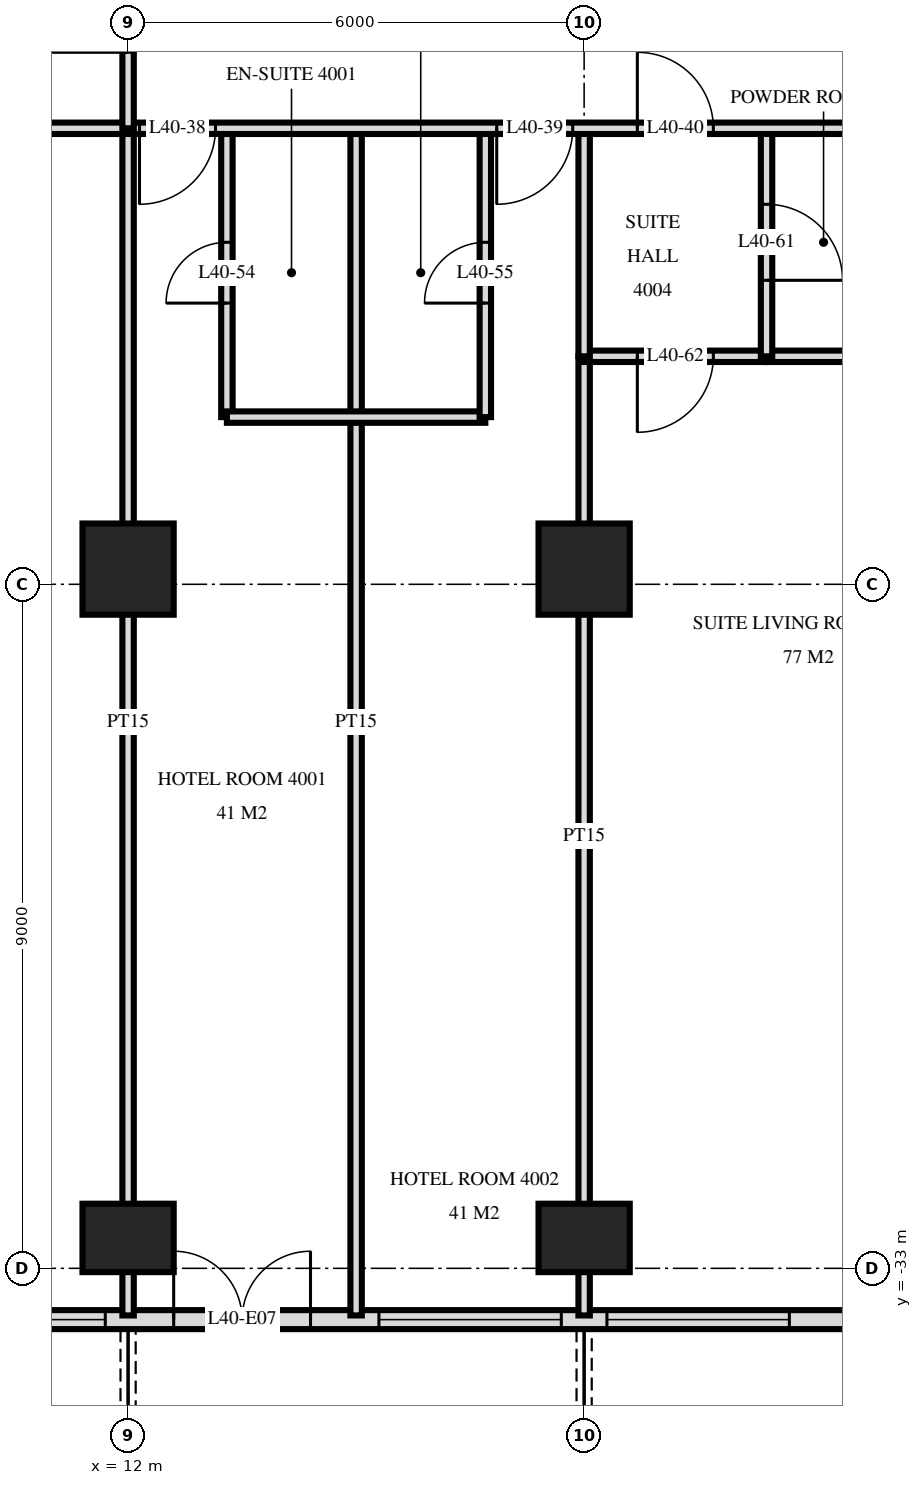
"""IFC4 building model, lengths in metres.
Left out: names, types, materials, properties, quantities, classifications, styles, units other than length and angle.
Written with IfcOpenShell. Run it as: python <this file> out.ifc"""

import sys

from ifc_helpers import new_model, si_unit, direction, frame, frame_2d, origin, origin_2d, place, context, subcontext, project, spatial, rectangle, extrude, element, fill, save


model = new_model("IFC4")
c1 = context("Model", 3, precision=1e-05, world=origin(), true_north=direction((0.0, 1.0)))
c2 = subcontext(c1, "Body", "Model", "MODEL_VIEW")
j1 = project(units=[si_unit("LENGTHUNIT", "METRE"), si_unit("PLANEANGLEUNIT", "RADIAN")], contexts=[c1])
p1 = place(None, origin())
s1 = spatial("IfcSite", under=j1, at=p1, CompositionType="ELEMENT")
p2 = place(p1, origin())
s2 = spatial("IfcBuilding", under=s1, at=p2, CompositionType="ELEMENT")
p3 = place(p2, frame((0.0, 0.0, 156.0)))
s3 = spatial("IfcBuildingStorey", under=s2, at=p3, CompositionType="ELEMENT", Elevation=156.0)
p4 = place(p3, frame((12.0, -32.6, 0.0), z_axis=(0.0, 0.0, 1.0), x_axis=(1.0, 0.0, 0.0)))
e1 = element("IfcColumn", 1, at=p4, inside=s3, PredefinedType="COLUMN", context=c2, shape_type="SweptSolid", body=[
    extrude(rectangle(XDim=1.2, YDim=0.9, at=origin_2d()), origin(), (0.0, 0.0, 1.0), 3.6),
])
p5 = place(p3, frame((12.0, -23.8, 0.0), z_axis=(0.0, 0.0, 1.0), x_axis=(1.0, 0.0, 0.0)))
e2 = element("IfcColumn", 2, at=p5, inside=s3, PredefinedType="COLUMN", context=c2, shape_type="SweptSolid", body=[
    extrude(rectangle(XDim=1.2, YDim=1.2, at=origin_2d()), origin(), (0.0, 0.0, 1.0), 3.6),
])
p6 = place(p3, frame((18.0, -32.6, 0.0), z_axis=(0.0, 0.0, 1.0), x_axis=(1.0, 0.0, 0.0)))
e3 = element("IfcColumn", 3, at=p6, inside=s3, PredefinedType="COLUMN", context=c2, shape_type="SweptSolid", body=[
    extrude(rectangle(XDim=1.2, YDim=0.9, at=origin_2d()), origin(), (0.0, 0.0, 1.0), 3.6),
])
p7 = place(p3, frame((18.0, -23.8, 0.0), z_axis=(0.0, 0.0, 1.0), x_axis=(1.0, 0.0, 0.0)))
e4 = element("IfcColumn", 4, at=p7, inside=s3, PredefinedType="COLUMN", context=c2, shape_type="SweptSolid", body=[
    extrude(rectangle(XDim=1.2, YDim=1.2, at=origin_2d()), origin(), (0.0, 0.0, 1.0), 3.6),
])
p8 = place(p3, frame((-23.675, -33.675, 0.0), z_axis=(0.0, 0.0, 1.0), x_axis=(1.0, 0.0, 0.0)))
e5 = element("IfcWall", 5, at=p8, inside=s3, PredefinedType="SOLIDWALL", context=c2, shape_type="SweptSolid", body=[
    extrude(rectangle(XDim=47.351, YDim=0.25, at=frame_2d((23.675, 0.0))), origin(), (0.0, 0.0, 1.0), 3.32),
])
p9 = place(p8, frame((0.275, 0.0, 0.3)))
e6 = element("IfcOpeningElement", 6, at=p9, cuts=e5, PredefinedType="OPENING", context=c2, shape_type="SweptSolid", body=[
    extrude(rectangle(XDim=2.4, YDim=2.1, at=frame_2d((1.2, 1.05))), frame((0.0, 0.135, 0.0), z_axis=(0.0, -1.0, 0.0), x_axis=(1.0, 0.0, 0.0)), (0.0, 0.0, 1.0), 0.27),
])
p10 = place(p8, frame((3.425, 0.0, 0.0)))
e7 = element("IfcOpeningElement", 7, at=p10, cuts=e5, PredefinedType="OPENING", context=c2, shape_type="SweptSolid", body=[
    extrude(rectangle(XDim=1.8, YDim=2.4, at=frame_2d((0.9, 1.2))), frame((0.0, 0.135, 0.0), z_axis=(0.0, -1.0, 0.0), x_axis=(1.0, 0.0, 0.0)), (0.0, 0.0, 1.0), 0.27),
])
p11 = place(p8, frame((7.775, 0.0, 0.0)))
e8 = element("IfcOpeningElement", 8, at=p11, cuts=e5, PredefinedType="OPENING", context=c2, shape_type="SweptSolid", body=[
    extrude(rectangle(XDim=1.8, YDim=2.4, at=frame_2d((0.9, 1.2))), frame((0.0, 0.135, 0.0), z_axis=(0.0, -1.0, 0.0), x_axis=(1.0, 0.0, 0.0)), (0.0, 0.0, 1.0), 0.27),
])
p12 = place(p8, frame((12.275, 0.0, 0.0)))
e9 = element("IfcOpeningElement", 9, at=p12, cuts=e5, PredefinedType="OPENING", context=c2, shape_type="SweptSolid", body=[
    extrude(rectangle(XDim=1.8, YDim=2.4, at=frame_2d((0.9, 1.2))), frame((0.0, 0.135, 0.0), z_axis=(0.0, -1.0, 0.0), x_axis=(1.0, 0.0, 0.0)), (0.0, 0.0, 1.0), 0.27),
])
p13 = place(p8, frame((14.975, 0.0, 0.3)))
e10 = element("IfcOpeningElement", 10, at=p13, cuts=e5, PredefinedType="OPENING", context=c2, shape_type="SweptSolid", body=[
    extrude(rectangle(XDim=2.4, YDim=2.1, at=frame_2d((1.2, 1.05))), frame((0.0, 0.135, 0.0), z_axis=(0.0, -1.0, 0.0), x_axis=(1.0, 0.0, 0.0)), (0.0, 0.0, 1.0), 0.27),
])
p14 = place(p8, frame((17.975, 0.0, 0.3)))
e11 = element("IfcOpeningElement", 11, at=p14, cuts=e5, PredefinedType="OPENING", context=c2, shape_type="SweptSolid", body=[
    extrude(rectangle(XDim=2.4, YDim=2.1, at=frame_2d((1.2, 1.05))), frame((0.0, 0.135, 0.0), z_axis=(0.0, -1.0, 0.0), x_axis=(1.0, 0.0, 0.0)), (0.0, 0.0, 1.0), 0.27),
])
p15 = place(p8, frame((21.275, 0.0, 0.0)))
e12 = element("IfcOpeningElement", 12, at=p15, cuts=e5, PredefinedType="OPENING", context=c2, shape_type="SweptSolid", body=[
    extrude(rectangle(XDim=1.8, YDim=2.4, at=frame_2d((0.9, 1.2))), frame((0.0, 0.135, 0.0), z_axis=(0.0, -1.0, 0.0), x_axis=(1.0, 0.0, 0.0)), (0.0, 0.0, 1.0), 0.27),
])
p16 = place(p8, frame((24.275, 0.0, 0.0)))
e13 = element("IfcOpeningElement", 13, at=p16, cuts=e5, PredefinedType="OPENING", context=c2, shape_type="SweptSolid", body=[
    extrude(rectangle(XDim=1.8, YDim=2.4, at=frame_2d((0.9, 1.2))), frame((0.0, 0.135, 0.0), z_axis=(0.0, -1.0, 0.0), x_axis=(1.0, 0.0, 0.0)), (0.0, 0.0, 1.0), 0.27),
])
p17 = place(p8, frame((26.975, 0.0, 0.3)))
e14 = element("IfcOpeningElement", 14, at=p17, cuts=e5, PredefinedType="OPENING", context=c2, shape_type="SweptSolid", body=[
    extrude(rectangle(XDim=2.4, YDim=2.1, at=frame_2d((1.2, 1.05))), frame((0.0, 0.135, 0.0), z_axis=(0.0, -1.0, 0.0), x_axis=(1.0, 0.0, 0.0)), (0.0, 0.0, 1.0), 0.27),
])
p18 = place(p8, frame((30.275, 0.0, 0.0)))
e15 = element("IfcOpeningElement", 15, at=p18, cuts=e5, PredefinedType="OPENING", context=c2, shape_type="SweptSolid", body=[
    extrude(rectangle(XDim=1.8, YDim=2.4, at=frame_2d((0.9, 1.2))), frame((0.0, 0.135, 0.0), z_axis=(0.0, -1.0, 0.0), x_axis=(1.0, 0.0, 0.0)), (0.0, 0.0, 1.0), 0.27),
])
p19 = place(p8, frame((32.975, 0.0, 0.3)))
e16 = element("IfcOpeningElement", 16, at=p19, cuts=e5, PredefinedType="OPENING", context=c2, shape_type="SweptSolid", body=[
    extrude(rectangle(XDim=2.4, YDim=2.1, at=frame_2d((1.2, 1.05))), frame((0.0, 0.135, 0.0), z_axis=(0.0, -1.0, 0.0), x_axis=(1.0, 0.0, 0.0)), (0.0, 0.0, 1.0), 0.27),
])
p20 = place(p8, frame((36.275, 0.0, 0.0)))
e17 = element("IfcOpeningElement", 17, at=p20, cuts=e5, PredefinedType="OPENING", context=c2, shape_type="SweptSolid", body=[
    extrude(rectangle(XDim=1.8, YDim=2.4, at=frame_2d((0.9, 1.2))), frame((0.0, 0.135, 0.0), z_axis=(0.0, -1.0, 0.0), x_axis=(1.0, 0.0, 0.0)), (0.0, 0.0, 1.0), 0.27),
])
p21 = place(p8, frame((38.975, 0.0, 0.3)))
e18 = element("IfcOpeningElement", 18, at=p21, cuts=e5, PredefinedType="OPENING", context=c2, shape_type="SweptSolid", body=[
    extrude(rectangle(XDim=2.4, YDim=2.1, at=frame_2d((1.2, 1.05))), frame((0.0, 0.135, 0.0), z_axis=(0.0, -1.0, 0.0), x_axis=(1.0, 0.0, 0.0)), (0.0, 0.0, 1.0), 0.27),
])
p22 = place(p8, frame((41.975, 0.0, 0.3)))
e19 = element("IfcOpeningElement", 19, at=p22, cuts=e5, PredefinedType="OPENING", context=c2, shape_type="SweptSolid", body=[
    extrude(rectangle(XDim=2.4, YDim=2.1, at=frame_2d((1.2, 1.05))), frame((0.0, 0.135, 0.0), z_axis=(0.0, -1.0, 0.0), x_axis=(1.0, 0.0, 0.0)), (0.0, 0.0, 1.0), 0.27),
])
p23 = place(p8, frame((45.125, 0.0, 0.0)))
e20 = element("IfcOpeningElement", 20, at=p23, cuts=e5, PredefinedType="OPENING", context=c2, shape_type="SweptSolid", body=[
    extrude(rectangle(XDim=1.8, YDim=2.4, at=frame_2d((0.9, 1.2))), frame((0.0, 0.135, 0.0), z_axis=(0.0, -1.0, 0.0), x_axis=(1.0, 0.0, 0.0)), (0.0, 0.0, 1.0), 0.27),
])
p24 = place(p3, frame((20.4, -21.0, 0.0), z_axis=(0.0, 0.0, 1.0), x_axis=(0.0, 1.0, 0.0)))
e21 = element("IfcWall", 21, at=p24, inside=s3, PredefinedType="PARTITIONING", context=c2, shape_type="SweptSolid", body=[
    extrude(rectangle(XDim=3.0, YDim=0.15, at=frame_2d((1.5, 0.0))), origin(), (0.0, 0.0, 1.0), 3.32),
])
p25 = place(p24, frame((1.0, 0.0, 0.0)))
e22 = element("IfcOpeningElement", 22, at=p25, cuts=e21, PredefinedType="OPENING", context=c2, shape_type="SweptSolid", body=[
    extrude(rectangle(XDim=1.0, YDim=2.1, at=frame_2d((0.5, 1.05))), frame((0.0, 0.085, 0.0), z_axis=(0.0, -1.0, 0.0), x_axis=(1.0, 0.0, 0.0)), (0.0, 0.0, 1.0), 0.17),
])
p26 = place(p3, frame((18.0, -21.0, 0.0), z_axis=(0.0, 0.0, 1.0), x_axis=(0.0, 1.0, 0.0)))
e23 = element("IfcWall", 23, at=p26, inside=s3, PredefinedType="PARTITIONING", context=c2, shape_type="SweptSolid", body=[
    extrude(rectangle(XDim=3.0, YDim=0.15, at=frame_2d((1.5, 0.0))), origin(), (0.0, 0.0, 1.0), 3.32),
])
p27 = place(p3, frame((18.0, -33.62, 0.0), z_axis=(0.0, 0.0, 1.0), x_axis=(0.0, 1.0, 0.0)))
e24 = element("IfcWall", 24, at=p27, inside=s3, PredefinedType="PARTITIONING", context=c2, shape_type="SweptSolid", body=[
    extrude(rectangle(XDim=12.62, YDim=0.15, at=frame_2d((6.31, 0.0))), origin(), (0.0, 0.0, 1.0), 3.32),
])
p28 = place(p3, frame((16.7, -21.8, 0.0), z_axis=(0.0, 0.0, 1.0), x_axis=(0.0, 1.0, 0.0)))
e25 = element("IfcWall", 25, at=p28, inside=s3, PredefinedType="PARTITIONING", context=c2, shape_type="SweptSolid", body=[
    extrude(rectangle(XDim=3.8, YDim=0.15, at=frame_2d((1.9, 0.0))), origin(), (0.0, 0.0, 1.0), 3.32),
])
p29 = place(p28, frame((1.5, 0.0, 0.0)))
e26 = element("IfcOpeningElement", 26, at=p29, cuts=e25, PredefinedType="OPENING", context=c2, shape_type="SweptSolid", body=[
    extrude(rectangle(XDim=0.8, YDim=2.1, at=frame_2d((0.4, 1.05))), frame((0.0, 0.085, 0.0), z_axis=(0.0, -1.0, 0.0), x_axis=(1.0, 0.0, 0.0)), (0.0, 0.0, 1.0), 0.17),
])
p30 = place(p3, frame((15.0, -33.62, 0.0), z_axis=(0.0, 0.0, 1.0), x_axis=(0.0, 1.0, 0.0)))
e27 = element("IfcWall", 27, at=p30, inside=s3, PredefinedType="PARTITIONING", context=c2, shape_type="SweptSolid", body=[
    extrude(rectangle(XDim=15.62, YDim=0.15, at=frame_2d((7.81, 0.0))), origin(), (0.0, 0.0, 1.0), 3.32),
])
p31 = place(p3, frame((13.3, -21.8, 0.0), z_axis=(0.0, 0.0, 1.0), x_axis=(0.0, 1.0, 0.0)))
e28 = element("IfcWall", 28, at=p31, inside=s3, PredefinedType="PARTITIONING", context=c2, shape_type="SweptSolid", body=[
    extrude(rectangle(XDim=3.8, YDim=0.15, at=frame_2d((1.9, 0.0))), origin(), (0.0, 0.0, 1.0), 3.32),
])
p32 = place(p31, frame((1.5, 0.0, 0.0)))
e29 = element("IfcOpeningElement", 29, at=p32, cuts=e28, PredefinedType="OPENING", context=c2, shape_type="SweptSolid", body=[
    extrude(rectangle(XDim=0.8, YDim=2.1, at=frame_2d((0.4, 1.05))), frame((0.0, 0.085, 0.0), z_axis=(0.0, -1.0, 0.0), x_axis=(1.0, 0.0, 0.0)), (0.0, 0.0, 1.0), 0.17),
])
p33 = place(p3, frame((12.0, -18.0, 0.0), z_axis=(0.0, 0.0, 1.0), x_axis=(0.0, 1.0, 0.0)))
e30 = element("IfcWall", 30, at=p33, inside=s3, PredefinedType="PARTITIONING", context=c2, shape_type="SweptSolid", body=[
    extrude(rectangle(XDim=2.95, YDim=0.15, at=frame_2d((1.475, 0.0))), origin(), (0.0, 0.0, 1.0), 3.32),
])
p34 = place(p33, frame((1.0, 0.0, 0.0)))
e31 = element("IfcOpeningElement", 31, at=p34, cuts=e30, PredefinedType="OPENING", context=c2, shape_type="SweptSolid", body=[
    extrude(rectangle(XDim=1.0, YDim=2.1, at=frame_2d((0.5, 1.05))), frame((0.0, 0.085, 0.0), z_axis=(0.0, -1.0, 0.0), x_axis=(1.0, 0.0, 0.0)), (0.0, 0.0, 1.0), 0.17),
])
p35 = place(p3, frame((12.0, -33.62, 0.0), z_axis=(0.0, 0.0, 1.0), x_axis=(0.0, 1.0, 0.0)))
e32 = element("IfcWall", 32, at=p35, inside=s3, PredefinedType="PARTITIONING", context=c2, shape_type="SweptSolid", body=[
    extrude(rectangle(XDim=15.62, YDim=0.15, at=frame_2d((7.81, 0.0))), origin(), (0.0, 0.0, 1.0), 3.32),
])
p36 = place(p3, frame((13.3, -21.8, 0.0), z_axis=(0.0, 0.0, 1.0), x_axis=(1.0, 0.0, 0.0)))
e33 = element("IfcWall", 33, at=p36, inside=s3, PredefinedType="PARTITIONING", context=c2, shape_type="SweptSolid", body=[
    extrude(rectangle(XDim=3.4, YDim=0.15, at=frame_2d((1.7, 0.0))), origin(), (0.0, 0.0, 1.0), 3.32),
])
p37 = place(p3, frame((18.0, -21.0, 0.0), z_axis=(0.0, 0.0, 1.0), x_axis=(1.0, 0.0, 0.0)))
e34 = element("IfcWall", 34, at=p37, inside=s3, PredefinedType="PARTITIONING", context=c2, shape_type="SweptSolid", body=[
    extrude(rectangle(XDim=2.4, YDim=0.15, at=frame_2d((1.2, 0.0))), origin(), (0.0, 0.0, 1.0), 3.32),
])
p38 = place(p37, frame((0.7, 0.0, 0.0)))
e35 = element("IfcOpeningElement", 35, at=p38, cuts=e34, PredefinedType="OPENING", context=c2, shape_type="SweptSolid", body=[
    extrude(rectangle(XDim=1.0, YDim=2.1, at=frame_2d((0.5, 1.05))), frame((0.0, 0.085, 0.0), z_axis=(0.0, -1.0, 0.0), x_axis=(1.0, 0.0, 0.0)), (0.0, 0.0, 1.0), 0.17),
])
p39 = place(p3, frame((20.4, -21.0, 0.0), z_axis=(0.0, 0.0, 1.0), x_axis=(1.0, 0.0, 0.0)))
e36 = element("IfcWall", 36, at=p39, inside=s3, PredefinedType="PLUMBINGWALL", context=c2, shape_type="SweptSolid", body=[
    extrude(rectangle(XDim=1.5, YDim=0.15, at=frame_2d((0.75, 0.0))), origin(), (0.0, 0.0, 1.0), 3.32),
])
p40 = place(p3, frame((-28.02, -18.0, 0.0), z_axis=(0.0, 0.0, 1.0), x_axis=(1.0, 0.0, 0.0)))
e37 = element("IfcWall", 37, at=p40, inside=s3, PredefinedType="PARTITIONING", context=c2, shape_type="SweptSolid", body=[
    extrude(rectangle(XDim=56.04, YDim=0.15, at=frame_2d((28.02, 0.0))), origin(), (0.0, 0.0, 1.0), 3.32),
])
p41 = place(p40, frame((12.52, 0.0, 0.0)))
e38 = element("IfcOpeningElement", 38, at=p41, cuts=e37, PredefinedType="OPENING", context=c2, shape_type="SweptSolid", body=[
    extrude(rectangle(XDim=1.0, YDim=2.1, at=frame_2d((0.5, 1.05))), frame((0.0, 0.085, 0.0), z_axis=(0.0, -1.0, 0.0), x_axis=(1.0, 0.0, 0.0)), (0.0, 0.0, 1.0), 0.17),
])
p42 = place(p40, frame((8.32, 0.0, 0.0)))
e39 = element("IfcOpeningElement", 39, at=p42, cuts=e37, PredefinedType="OPENING", context=c2, shape_type="SweptSolid", body=[
    extrude(rectangle(XDim=1.0, YDim=2.1, at=frame_2d((0.5, 1.05))), frame((0.0, 0.085, 0.0), z_axis=(0.0, -1.0, 0.0), x_axis=(1.0, 0.0, 0.0)), (0.0, 0.0, 1.0), 0.17),
])
p43 = place(p40, frame((40.17, 0.0, 0.0)))
e40 = element("IfcOpeningElement", 40, at=p43, cuts=e37, PredefinedType="OPENING", context=c2, shape_type="SweptSolid", body=[
    extrude(rectangle(XDim=1.0, YDim=2.1, at=frame_2d((0.5, 1.05))), frame((0.0, 0.085, 0.0), z_axis=(0.0, -1.0, 0.0), x_axis=(1.0, 0.0, 0.0)), (0.0, 0.0, 1.0), 0.17),
])
p44 = place(p40, frame((44.87, 0.0, 0.0)))
e41 = element("IfcOpeningElement", 41, at=p44, cuts=e37, PredefinedType="OPENING", context=c2, shape_type="SweptSolid", body=[
    extrude(rectangle(XDim=1.0, YDim=2.1, at=frame_2d((0.5, 1.05))), frame((0.0, 0.085, 0.0), z_axis=(0.0, -1.0, 0.0), x_axis=(1.0, 0.0, 0.0)), (0.0, 0.0, 1.0), 0.17),
])
p45 = place(p40, frame((46.72, 0.0, 0.0)))
e42 = element("IfcOpeningElement", 42, at=p45, cuts=e37, PredefinedType="OPENING", context=c2, shape_type="SweptSolid", body=[
    extrude(rectangle(XDim=1.0, YDim=2.1, at=frame_2d((0.5, 1.05))), frame((0.0, 0.085, 0.0), z_axis=(0.0, -1.0, 0.0), x_axis=(1.0, 0.0, 0.0)), (0.0, 0.0, 1.0), 0.17),
])
p46 = place(p40, frame((18.52, 0.0, 0.0)))
e43 = element("IfcOpeningElement", 43, at=p46, cuts=e37, PredefinedType="OPENING", context=c2, shape_type="SweptSolid", body=[
    extrude(rectangle(XDim=1.0, YDim=2.1, at=frame_2d((0.5, 1.05))), frame((0.0, 0.085, 0.0), z_axis=(0.0, -1.0, 0.0), x_axis=(1.0, 0.0, 0.0)), (0.0, 0.0, 1.0), 0.17),
])
p47 = place(p40, frame((24.52, 0.0, 0.0)))
e44 = element("IfcOpeningElement", 44, at=p47, cuts=e37, PredefinedType="OPENING", context=c2, shape_type="SweptSolid", body=[
    extrude(rectangle(XDim=1.0, YDim=2.1, at=frame_2d((0.5, 1.05))), frame((0.0, 0.085, 0.0), z_axis=(0.0, -1.0, 0.0), x_axis=(1.0, 0.0, 0.0)), (0.0, 0.0, 1.0), 0.17),
])
p48 = place(p40, frame((30.52, 0.0, 0.0)))
e45 = element("IfcOpeningElement", 45, at=p48, cuts=e37, PredefinedType="OPENING", context=c2, shape_type="SweptSolid", body=[
    extrude(rectangle(XDim=1.0, YDim=2.1, at=frame_2d((0.5, 1.05))), frame((0.0, 0.085, 0.0), z_axis=(0.0, -1.0, 0.0), x_axis=(1.0, 0.0, 0.0)), (0.0, 0.0, 1.0), 0.17),
])
p49 = place(p40, frame((36.52, 0.0, 0.0)))
e46 = element("IfcOpeningElement", 46, at=p49, cuts=e37, PredefinedType="OPENING", context=c2, shape_type="SweptSolid", body=[
    extrude(rectangle(XDim=1.0, YDim=2.1, at=frame_2d((0.5, 1.05))), frame((0.0, 0.085, 0.0), z_axis=(0.0, -1.0, 0.0), x_axis=(1.0, 0.0, 0.0)), (0.0, 0.0, 1.0), 0.17),
])
p50 = place(p19, origin())
e47 = element("IfcWindow", 47, at=p50, inside=s3, PartitioningType="SINGLE_PANEL", PredefinedType="WINDOW", context=c2, shape_type="SweptSolid", body=[
    extrude(rectangle(XDim=2.4, YDim=2.1, at=frame_2d((1.2, 1.05))), frame((0.0, 0.03, 0.0), z_axis=(0.0, -1.0, 0.0), x_axis=(1.0, 0.0, 0.0)), (0.0, 0.0, 1.0), 0.06),
])
fill(e16, e47)
p51 = place(p20, origin())
e48 = element("IfcDoor", 48, at=p51, inside=s3, OperationType="DOUBLE_DOOR_SINGLE_SWING", PredefinedType="DOOR", context=c2, shape_type="SweptSolid", body=[
    extrude(rectangle(XDim=1.8, YDim=2.4, at=frame_2d((0.9, 1.2))), frame((0.0, 0.025, 0.0), z_axis=(0.0, -1.0, 0.0), x_axis=(1.0, 0.0, 0.0)), (0.0, 0.0, 1.0), 0.05),
])
fill(e17, e48)
p52 = place(p21, origin())
e49 = element("IfcWindow", 49, at=p52, inside=s3, PartitioningType="SINGLE_PANEL", PredefinedType="WINDOW", context=c2, shape_type="SweptSolid", body=[
    extrude(rectangle(XDim=2.4, YDim=2.1, at=frame_2d((1.2, 1.05))), frame((0.0, 0.03, 0.0), z_axis=(0.0, -1.0, 0.0), x_axis=(1.0, 0.0, 0.0)), (0.0, 0.0, 1.0), 0.06),
])
fill(e18, e49)
p53 = place(p22, origin())
e50 = element("IfcWindow", 50, at=p53, inside=s3, PartitioningType="SINGLE_PANEL", PredefinedType="WINDOW", context=c2, shape_type="SweptSolid", body=[
    extrude(rectangle(XDim=2.4, YDim=2.1, at=frame_2d((1.2, 1.05))), frame((0.0, 0.03, 0.0), z_axis=(0.0, -1.0, 0.0), x_axis=(1.0, 0.0, 0.0)), (0.0, 0.0, 1.0), 0.06),
])
fill(e19, e50)
p54 = place(p43, frame((0.5, 0.0, 0.0), z_axis=(0.0, 0.0, 1.0), x_axis=(-1.0, 0.0, 0.0)))
e51 = element("IfcDoor", 51, at=p54, inside=s3, OperationType="SINGLE_SWING_LEFT", PredefinedType="DOOR", context=c2, shape_type="SweptSolid", body=[
    extrude(rectangle(XDim=1.0, YDim=2.1, at=frame_2d((0.0, 1.05))), frame((0.0, -0.025, 0.0), z_axis=(0.0, 1.0, 0.0), x_axis=(-1.0, 0.0, 0.0)), (0.0, 0.0, 1.0), 0.05),
])
fill(e40, e51)
p55 = place(p44, frame((0.5, 0.0, 0.0), z_axis=(0.0, 0.0, 1.0), x_axis=(-1.0, 0.0, 0.0)))
e52 = element("IfcDoor", 52, at=p55, inside=s3, OperationType="SINGLE_SWING_LEFT", PredefinedType="DOOR", context=c2, shape_type="SweptSolid", body=[
    extrude(rectangle(XDim=1.0, YDim=2.1, at=frame_2d((0.0, 1.05))), frame((0.0, -0.025, 0.0), z_axis=(0.0, 1.0, 0.0), x_axis=(-1.0, 0.0, 0.0)), (0.0, 0.0, 1.0), 0.05),
])
fill(e41, e52)
p56 = place(p45, origin())
e53 = element("IfcDoor", 53, at=p56, inside=s3, OperationType="SINGLE_SWING_RIGHT", PredefinedType="DOOR", context=c2, shape_type="SweptSolid", body=[
    extrude(rectangle(XDim=1.0, YDim=2.1, at=frame_2d((0.5, 1.05))), frame((0.0, 0.025, 0.0), z_axis=(0.0, -1.0, 0.0), x_axis=(1.0, 0.0, 0.0)), (0.0, 0.0, 1.0), 0.05),
])
fill(e42, e53)
p57 = place(p32, origin())
e54 = element("IfcDoor", 54, at=p57, inside=s3, OperationType="SINGLE_SWING_RIGHT", PredefinedType="DOOR", context=c2, shape_type="SweptSolid", body=[
    extrude(rectangle(XDim=0.8, YDim=2.1, at=frame_2d((0.4, 1.05))), frame((0.0, 0.025, 0.0), z_axis=(0.0, -1.0, 0.0), x_axis=(1.0, 0.0, 0.0)), (0.0, 0.0, 1.0), 0.05),
])
fill(e29, e54)
p58 = place(p29, origin())
e55 = element("IfcDoor", 55, at=p58, inside=s3, OperationType="SINGLE_SWING_RIGHT", PredefinedType="DOOR", context=c2, shape_type="SweptSolid", body=[
    extrude(rectangle(XDim=0.8, YDim=2.1, at=frame_2d((0.4, 1.05))), frame((0.0, 0.025, 0.0), z_axis=(0.0, -1.0, 0.0), x_axis=(1.0, 0.0, 0.0)), (0.0, 0.0, 1.0), 0.05),
])
fill(e26, e55)
p59 = place(p25, frame((0.5, 0.0, 0.0), z_axis=(0.0, 0.0, 1.0), x_axis=(-1.0, 0.0, 0.0)))
e56 = element("IfcDoor", 56, at=p59, inside=s3, OperationType="SINGLE_SWING_LEFT", PredefinedType="DOOR", context=c2, shape_type="SweptSolid", body=[
    extrude(rectangle(XDim=1.0, YDim=2.1, at=frame_2d((0.0, 1.05))), frame((0.0, -0.025, 0.0), z_axis=(0.0, 1.0, 0.0), x_axis=(-1.0, 0.0, 0.0)), (0.0, 0.0, 1.0), 0.05),
])
fill(e22, e56)
p60 = place(p38, frame((0.5, 0.0, 0.0), z_axis=(0.0, 0.0, 1.0), x_axis=(-1.0, 0.0, 0.0)))
e57 = element("IfcDoor", 57, at=p60, inside=s3, OperationType="SINGLE_SWING_LEFT", PredefinedType="DOOR", context=c2, shape_type="SweptSolid", body=[
    extrude(rectangle(XDim=1.0, YDim=2.1, at=frame_2d((0.0, 1.05))), frame((0.0, -0.025, 0.0), z_axis=(0.0, 1.0, 0.0), x_axis=(-1.0, 0.0, 0.0)), (0.0, 0.0, 1.0), 0.05),
])
fill(e35, e57)
save(model, sys.argv[1])
